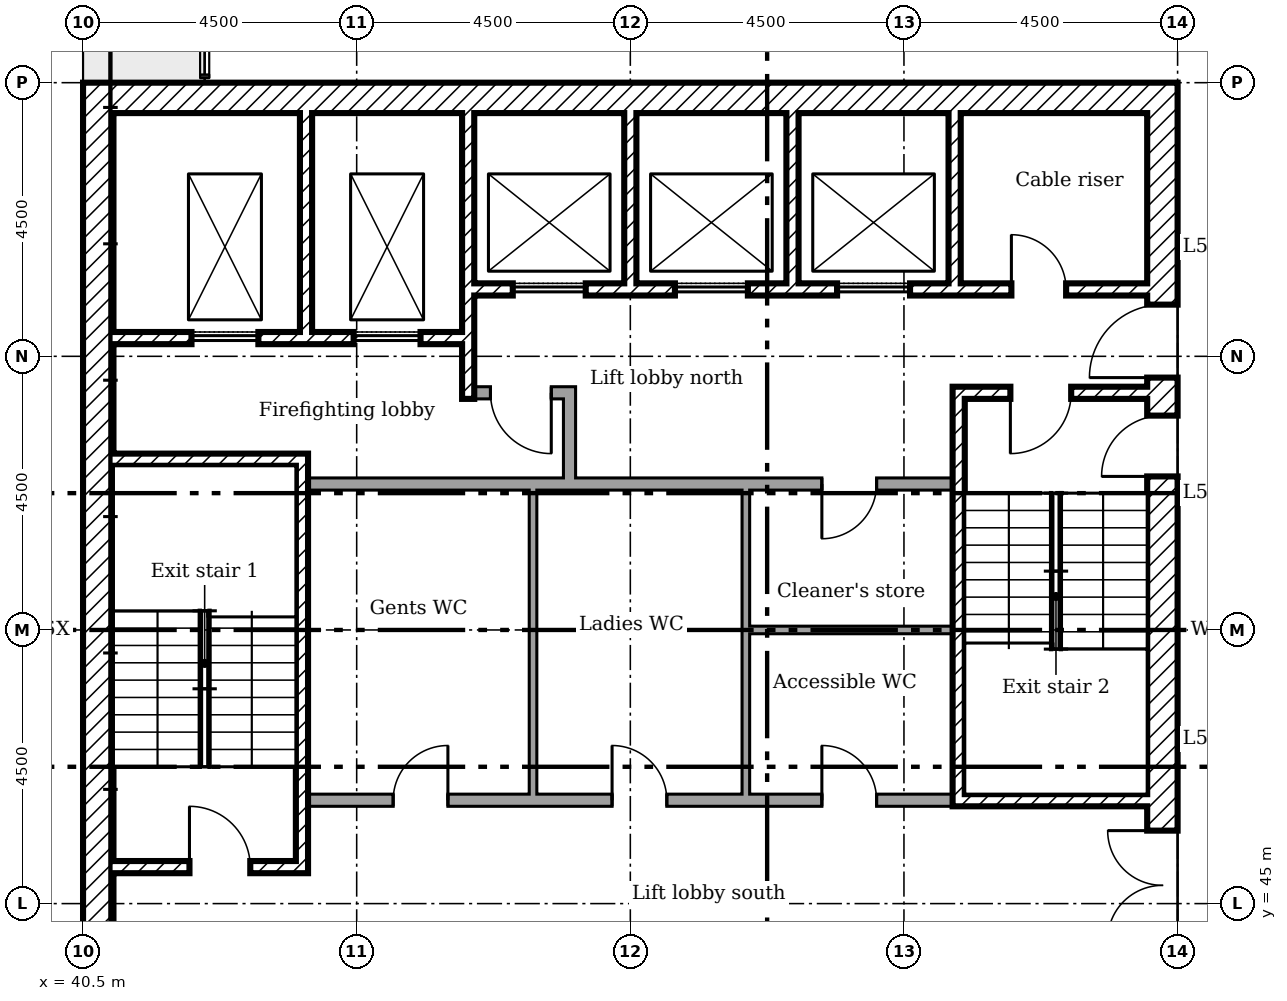
"""IFC4 building model, lengths in metres.
Left out: names, types, materials, properties, quantities, classifications, styles, units other than length and angle.
Written with IfcOpenShell. Run it as: python <this file> out.ifc"""

import sys

from ifc_helpers import new_model, si_unit, direction, frame, frame_2d, origin, place, context, subcontext, project, spatial, rectangle, extrude, element, fill, save


model = new_model("IFC4")
c1 = context("Model", 3, precision=1e-05, world=origin(), true_north=direction((0.0, 1.0)))
c2 = subcontext(c1, "Body", "Model", "MODEL_VIEW")
j1 = project(units=[si_unit("LENGTHUNIT", "METRE"), si_unit("PLANEANGLEUNIT", "RADIAN")], contexts=[c1])
p1 = place(None, origin())
s1 = spatial("IfcSite", under=j1, at=p1, CompositionType="ELEMENT")
p2 = place(p1, origin())
s2 = spatial("IfcBuilding", under=s1, at=p2, CompositionType="ELEMENT")
p3 = place(p2, frame((0.0, 0.0, 210.0)))
s3 = spatial("IfcBuildingStorey", under=s2, at=p3, CompositionType="ELEMENT", Elevation=210.0)
p4 = place(p3, frame((58.25, 40.5, 0.0), z_axis=(0.0, 0.0, 1.0), x_axis=(0.0, 1.0, 0.0)))
e1 = element("IfcWall", 1, at=p4, inside=s3, PredefinedType="SHEAR", context=c2, shape_type="SweptSolid", body=[
    extrude(rectangle(XDim=18.0, YDim=0.5, at=frame_2d((9.0, 0.0))), origin(), (0.0, 0.0, 1.0), 3.35),
])
p5 = place(p4, frame((13.15, 0.0, 0.0)))
e2 = element("IfcOpeningElement", 2, at=p5, cuts=e1, PredefinedType="OPENING", context=c2, shape_type="SweptSolid", body=[
    extrude(rectangle(XDim=1.2, YDim=2.1, at=frame_2d((0.6, 1.05))), frame((0.0, 0.26, 0.0), z_axis=(0.0, -1.0, 0.0), x_axis=(1.0, 0.0, 0.0)), (0.0, 0.0, 1.0), 0.52),
])
p6 = place(p4, frame((3.9, 0.0, 0.0)))
e3 = element("IfcOpeningElement", 3, at=p6, cuts=e1, PredefinedType="OPENING", context=c2, shape_type="SweptSolid", body=[
    extrude(rectangle(XDim=1.8, YDim=2.1, at=frame_2d((0.9, 1.05))), frame((0.0, 0.26, 0.0), z_axis=(0.0, -1.0, 0.0), x_axis=(1.0, 0.0, 0.0)), (0.0, 0.0, 1.0), 0.52),
])
p7 = place(p4, frame((11.525, 0.0, 0.0)))
e4 = element("IfcOpeningElement", 4, at=p7, cuts=e1, PredefinedType="OPENING", context=c2, shape_type="SweptSolid", body=[
    extrude(rectangle(XDim=1.0, YDim=2.1, at=frame_2d((0.5, 1.05))), frame((0.0, 0.26, 0.0), z_axis=(0.0, -1.0, 0.0), x_axis=(1.0, 0.0, 0.0)), (0.0, 0.0, 1.0), 0.52),
])
p8 = place(p3, frame((40.5, 58.25, 0.0)))
e5 = element("IfcWall", 5, at=p8, inside=s3, PredefinedType="SHEAR", context=c2, shape_type="SweptSolid", body=[
    extrude(rectangle(XDim=17.5, YDim=0.5, at=frame_2d((8.75, 0.0))), origin(), (0.0, 0.0, 1.0), 3.35),
])
p9 = place(p3, frame((40.75, 41.0, 0.0), z_axis=(0.0, 0.0, 1.0), x_axis=(0.0, 1.0, 0.0)))
e6 = element("IfcWall", 6, at=p9, inside=s3, PredefinedType="SHEAR", context=c2, shape_type="SweptSolid", body=[
    extrude(rectangle(XDim=17.0, YDim=0.5, at=frame_2d((8.5, 0.0))), origin(), (0.0, 0.0, 1.0), 3.35),
])
p10 = place(p3, frame((44.167, 58.0, 0.0), z_axis=(0.0, 0.0, 1.0), x_axis=(0.0, -1.0, 0.0)))
e7 = element("IfcWall", 7, at=p10, inside=s3, PredefinedType="SHEAR", context=c2, shape_type="SweptSolid", body=[
    extrude(rectangle(XDim=3.6, YDim=0.2, at=frame_2d((1.8, 0.0))), origin(), (0.0, 0.0, 1.0), 3.35),
])
p11 = place(p3, frame((46.833, 58.0, 0.0), z_axis=(0.0, 0.0, 1.0), x_axis=(0.0, -1.0, 0.0)))
e8 = element("IfcWall", 8, at=p11, inside=s3, PredefinedType="SHEAR", context=c2, shape_type="SweptSolid", body=[
    extrude(rectangle(XDim=4.7, YDim=0.2, at=frame_2d((2.35, 0.0))), origin(), (0.0, 0.0, 1.0), 3.35),
])
for number, where, z_axis, x_axis in (
    (9, (49.5, 58.0, 0.0), (0.0, 0.0, 1.0), (0.0, -1.0, 0.0)),
    (10, (52.167, 58.0, 0.0), (0.0, 0.0, 1.0), (0.0, -1.0, 0.0)),
    (11, (54.833, 58.0, 0.0), (0.0, 0.0, 1.0), (0.0, -1.0, 0.0)),
):
    element("IfcWall", number, at=place(p3, frame(where, z_axis=z_axis, x_axis=x_axis)), inside=s3, PredefinedType="SHEAR", context=c2, shape_type="SweptSolid", body=[
        extrude(rectangle(XDim=2.8, YDim=0.2, at=frame_2d((1.4, 0.0))), origin(), (0.0, 0.0, 1.0), 3.35),
    ])
p12 = place(p3, frame((48.5, 51.9, 0.0), z_axis=(0.0, 0.0, 1.0), x_axis=(0.0, 1.0, 0.0)))
e12 = element("IfcWall", 12, at=p12, inside=s3, PredefinedType="PARTITIONING", context=c2, shape_type="SweptSolid", body=[
    extrude(rectangle(XDim=1.6, YDim=0.2, at=frame_2d((0.8, 0.0))), origin(), (0.0, 0.0, 1.0), 3.35),
])
p13 = place(p3, frame((46.933, 53.4, 0.0)))
e13 = element("IfcWall", 13, at=p13, inside=s3, PredefinedType="PARTITIONING", context=c2, shape_type="SweptSolid", body=[
    extrude(rectangle(XDim=1.467, YDim=0.2, at=frame_2d((0.733, 0.0))), origin(), (0.0, 0.0, 1.0), 3.35),
])
p14 = place(p13, frame((0.267, 0.0, 0.0)))
e14 = element("IfcOpeningElement", 14, at=p14, cuts=e13, PredefinedType="OPENING", context=c2, shape_type="SweptSolid", body=[
    extrude(rectangle(XDim=1.0, YDim=2.1, at=frame_2d((0.5, 1.05))), frame((0.0, 0.11, 0.0), z_axis=(0.0, -1.0, 0.0), x_axis=(1.0, 0.0, 0.0)), (0.0, 0.0, 1.0), 0.22),
])
p15 = place(p3, frame((46.933, 55.1, 0.0)))
e15 = element("IfcWall", 15, at=p15, inside=s3, PredefinedType="SHEAR", context=c2, shape_type="SweptSolid", body=[
    extrude(rectangle(XDim=11.067, YDim=0.2, at=frame_2d((5.533, 0.0))), origin(), (0.0, 0.0, 1.0), 3.35),
])
p16 = place(p15, frame((8.833, 0.0, 0.0)))
e16 = element("IfcOpeningElement", 16, at=p16, cuts=e15, PredefinedType="OPENING", context=c2, shape_type="SweptSolid", body=[
    extrude(rectangle(XDim=0.9, YDim=2.1, at=frame_2d((0.45, 1.05))), frame((0.0, 0.11, 0.0), z_axis=(0.0, -1.0, 0.0), x_axis=(1.0, 0.0, 0.0)), (0.0, 0.0, 1.0), 0.22),
])
p17 = place(p15, frame((0.633, 0.0, 0.0)))
e17 = element("IfcOpeningElement", 17, at=p17, cuts=e15, PredefinedType="OPENING", context=c2, shape_type="SweptSolid", body=[
    extrude(rectangle(XDim=1.2, YDim=2.1, at=frame_2d((0.6, 1.05))), frame((0.0, 0.11, 0.0), z_axis=(0.0, -1.0, 0.0), x_axis=(1.0, 0.0, 0.0)), (0.0, 0.0, 1.0), 0.22),
])
p18 = place(p15, frame((3.3, 0.0, 0.0)))
e18 = element("IfcOpeningElement", 18, at=p18, cuts=e15, PredefinedType="OPENING", context=c2, shape_type="SweptSolid", body=[
    extrude(rectangle(XDim=1.2, YDim=2.1, at=frame_2d((0.6, 1.05))), frame((0.0, 0.11, 0.0), z_axis=(0.0, -1.0, 0.0), x_axis=(1.0, 0.0, 0.0)), (0.0, 0.0, 1.0), 0.22),
])
p19 = place(p15, frame((5.967, 0.0, 0.0)))
e19 = element("IfcOpeningElement", 19, at=p19, cuts=e15, PredefinedType="OPENING", context=c2, shape_type="SweptSolid", body=[
    extrude(rectangle(XDim=1.2, YDim=2.1, at=frame_2d((0.6, 1.05))), frame((0.0, 0.11, 0.0), z_axis=(0.0, -1.0, 0.0), x_axis=(1.0, 0.0, 0.0)), (0.0, 0.0, 1.0), 0.22),
])
p20 = place(p3, frame((41.0, 54.3, 0.0)))
e20 = element("IfcWall", 20, at=p20, inside=s3, PredefinedType="SHEAR", context=c2, shape_type="SweptSolid", body=[
    extrude(rectangle(XDim=5.733, YDim=0.2, at=frame_2d((2.867, 0.0))), origin(), (0.0, 0.0, 1.0), 3.35),
])
p21 = place(p20, frame((1.283, 0.0, 0.0)))
e21 = element("IfcOpeningElement", 21, at=p21, cuts=e20, PredefinedType="OPENING", context=c2, shape_type="SweptSolid", body=[
    extrude(rectangle(XDim=1.1, YDim=2.1, at=frame_2d((0.55, 1.05))), frame((0.0, 0.11, 0.0), z_axis=(0.0, -1.0, 0.0), x_axis=(1.0, 0.0, 0.0)), (0.0, 0.0, 1.0), 0.22),
])
p22 = place(p20, frame((3.95, 0.0, 0.0)))
e22 = element("IfcOpeningElement", 22, at=p22, cuts=e20, PredefinedType="OPENING", context=c2, shape_type="SweptSolid", body=[
    extrude(rectangle(XDim=1.1, YDim=2.1, at=frame_2d((0.55, 1.05))), frame((0.0, 0.11, 0.0), z_axis=(0.0, -1.0, 0.0), x_axis=(1.0, 0.0, 0.0)), (0.0, 0.0, 1.0), 0.22),
])
p23 = place(p3, frame((44.1, 45.5, 0.0), z_axis=(0.0, 0.0, 1.0), x_axis=(0.0, 1.0, 0.0)))
e23 = element("IfcWall", 23, at=p23, inside=s3, PredefinedType="SHEAR", context=c2, shape_type="SweptSolid", body=[
    extrude(rectangle(XDim=6.9, YDim=0.2, at=frame_2d((3.45, 0.0))), origin(), (0.0, 0.0, 1.0), 3.35),
])
p24 = place(p3, frame((41.0, 52.3, 0.0)))
e24 = element("IfcWall", 24, at=p24, inside=s3, PredefinedType="SHEAR", context=c2, shape_type="SweptSolid", body=[
    extrude(rectangle(XDim=3.0, YDim=0.2, at=frame_2d((1.5, 0.0))), origin(), (0.0, 0.0, 1.0), 3.35),
])
p25 = place(p3, frame((41.0, 45.6, 0.0)))
e25 = element("IfcWall", 25, at=p25, inside=s3, PredefinedType="SHEAR", context=c2, shape_type="SweptSolid", body=[
    extrude(rectangle(XDim=3.0, YDim=0.2, at=frame_2d((1.5, 0.0))), origin(), (0.0, 0.0, 1.0), 3.35),
])
p26 = place(p25, frame((1.25, 0.0, 0.0)))
e26 = element("IfcOpeningElement", 26, at=p26, cuts=e25, PredefinedType="OPENING", context=c2, shape_type="SweptSolid", body=[
    extrude(rectangle(XDim=1.0, YDim=2.1, at=frame_2d((0.5, 1.05))), frame((0.0, 0.11, 0.0), z_axis=(0.0, -1.0, 0.0), x_axis=(1.0, 0.0, 0.0)), (0.0, 0.0, 1.0), 0.22),
])
p27 = place(p3, frame((54.8, 53.4, 0.0)))
e27 = element("IfcWall", 27, at=p27, inside=s3, PredefinedType="SHEAR", context=c2, shape_type="SweptSolid", body=[
    extrude(rectangle(XDim=3.2, YDim=0.2, at=frame_2d((1.6, 0.0))), origin(), (0.0, 0.0, 1.0), 3.35),
])
p28 = place(p27, frame((0.95, 0.0, 0.0)))
e28 = element("IfcOpeningElement", 28, at=p28, cuts=e27, PredefinedType="OPENING", context=c2, shape_type="SweptSolid", body=[
    extrude(rectangle(XDim=1.0, YDim=2.1, at=frame_2d((0.5, 1.05))), frame((0.0, 0.11, 0.0), z_axis=(0.0, -1.0, 0.0), x_axis=(1.0, 0.0, 0.0)), (0.0, 0.0, 1.0), 0.22),
])
p29 = place(p3, frame((54.8, 46.7, 0.0)))
e29 = element("IfcWall", 29, at=p29, inside=s3, PredefinedType="SHEAR", context=c2, shape_type="SweptSolid", body=[
    extrude(rectangle(XDim=3.2, YDim=0.2, at=frame_2d((1.6, 0.0))), origin(), (0.0, 0.0, 1.0), 3.35),
])
p30 = place(p3, frame((54.9, 46.8, 0.0), z_axis=(0.0, 0.0, 1.0), x_axis=(0.0, 1.0, 0.0)))
e30 = element("IfcWall", 30, at=p30, inside=s3, PredefinedType="SHEAR", context=c2, shape_type="SweptSolid", body=[
    extrude(rectangle(XDim=6.5, YDim=0.2, at=frame_2d((3.25, 0.0))), origin(), (0.0, 0.0, 1.0), 3.35),
])
p31 = place(p3, frame((44.2, 51.9, 0.0)))
e31 = element("IfcWall", 31, at=p31, inside=s3, PredefinedType="PARTITIONING", context=c2, shape_type="SweptSolid", body=[
    extrude(rectangle(XDim=10.6, YDim=0.2, at=frame_2d((5.3, 0.0))), origin(), (0.0, 0.0, 1.0), 3.35),
])
p32 = place(p31, frame((8.45, 0.0, 0.0)))
e32 = element("IfcOpeningElement", 32, at=p32, cuts=e31, PredefinedType="OPENING", context=c2, shape_type="SweptSolid", body=[
    extrude(rectangle(XDim=0.9, YDim=2.1, at=frame_2d((0.45, 1.05))), frame((0.0, 0.11, 0.0), z_axis=(0.0, -1.0, 0.0), x_axis=(1.0, 0.0, 0.0)), (0.0, 0.0, 1.0), 0.22),
])
p33 = place(p3, frame((44.2, 46.7, 0.0)))
e33 = element("IfcWall", 33, at=p33, inside=s3, PredefinedType="PARTITIONING", context=c2, shape_type="SweptSolid", body=[
    extrude(rectangle(XDim=10.6, YDim=0.2, at=frame_2d((5.3, 0.0))), origin(), (0.0, 0.0, 1.0), 3.35),
])
p34 = place(p33, frame((1.4, 0.0, 0.0)))
e34 = element("IfcOpeningElement", 34, at=p34, cuts=e33, PredefinedType="OPENING", context=c2, shape_type="SweptSolid", body=[
    extrude(rectangle(XDim=0.9, YDim=2.1, at=frame_2d((0.45, 1.05))), frame((0.0, 0.11, 0.0), z_axis=(0.0, -1.0, 0.0), x_axis=(1.0, 0.0, 0.0)), (0.0, 0.0, 1.0), 0.22),
])
p35 = place(p33, frame((5.0, 0.0, 0.0)))
e35 = element("IfcOpeningElement", 35, at=p35, cuts=e33, PredefinedType="OPENING", context=c2, shape_type="SweptSolid", body=[
    extrude(rectangle(XDim=0.9, YDim=2.1, at=frame_2d((0.45, 1.05))), frame((0.0, 0.11, 0.0), z_axis=(0.0, -1.0, 0.0), x_axis=(1.0, 0.0, 0.0)), (0.0, 0.0, 1.0), 0.22),
])
p36 = place(p33, frame((8.45, 0.0, 0.0)))
e36 = element("IfcOpeningElement", 36, at=p36, cuts=e33, PredefinedType="OPENING", context=c2, shape_type="SweptSolid", body=[
    extrude(rectangle(XDim=0.9, YDim=2.1, at=frame_2d((0.45, 1.05))), frame((0.0, 0.11, 0.0), z_axis=(0.0, -1.0, 0.0), x_axis=(1.0, 0.0, 0.0)), (0.0, 0.0, 1.0), 0.22),
])
p37 = place(p3, frame((47.9, 46.8, 0.0), z_axis=(0.0, 0.0, 1.0), x_axis=(0.0, 1.0, 0.0)))
e37 = element("IfcWall", 37, at=p37, inside=s3, PredefinedType="PARTITIONING", context=c2, shape_type="SweptSolid", body=[
    extrude(rectangle(XDim=5.0, YDim=0.125, at=frame_2d((2.5, 0.0))), origin(), (0.0, 0.0, 1.0), 3.35),
])
p38 = place(p3, frame((51.4, 46.8, 0.0), z_axis=(0.0, 0.0, 1.0), x_axis=(0.0, 1.0, 0.0)))
e38 = element("IfcWall", 38, at=p38, inside=s3, PredefinedType="PARTITIONING", context=c2, shape_type="SweptSolid", body=[
    extrude(rectangle(XDim=2.762, YDim=0.125, at=frame_2d((1.381, 0.0))), origin(), (0.0, 0.0, 1.0), 3.35),
])
p39 = place(p3, frame((54.8, 49.5, 0.0), z_axis=(0.0, 0.0, 1.0), x_axis=(-1.0, 0.0, 0.0)))
e39 = element("IfcWall", 39, at=p39, inside=s3, PredefinedType="PARTITIONING", context=c2, shape_type="SweptSolid", body=[
    extrude(rectangle(XDim=3.338, YDim=0.125, at=frame_2d((1.669, 0.0))), origin(), (0.0, 0.0, 1.0), 3.35),
])
p40 = place(p3, frame((51.4, 49.5, 0.0), z_axis=(0.0, 0.0, 1.0), x_axis=(0.0, 1.0, 0.0)))
e40 = element("IfcWall", 40, at=p40, inside=s3, PredefinedType="PARTITIONING", context=c2, shape_type="SweptSolid", body=[
    extrude(rectangle(XDim=2.3, YDim=0.125, at=frame_2d((1.15, 0.0))), origin(), (0.0, 0.0, 1.0), 3.35),
])
p41 = place(p5, origin())
e41 = element("IfcDoor", 41, at=p41, inside=s3, OperationType="SINGLE_SWING_RIGHT", PredefinedType="DOOR", context=c2, shape_type="SweptSolid", body=[
    extrude(rectangle(XDim=1.2, YDim=2.1, at=frame_2d((0.6, 1.05))), frame((0.0, 0.025, 0.0), z_axis=(0.0, -1.0, 0.0), x_axis=(1.0, 0.0, 0.0)), (0.0, 0.0, 1.0), 0.05),
])
fill(e2, e41)
p42 = place(p6, origin())
e42 = element("IfcDoor", 42, at=p42, inside=s3, OperationType="DOUBLE_DOOR_SINGLE_SWING", PredefinedType="DOOR", context=c2, shape_type="SweptSolid", body=[
    extrude(rectangle(XDim=1.8, YDim=2.1, at=frame_2d((0.9, 1.05))), frame((0.0, 0.025, 0.0), z_axis=(0.0, -1.0, 0.0), x_axis=(1.0, 0.0, 0.0)), (0.0, 0.0, 1.0), 0.05),
])
fill(e3, e42)
p43 = place(p26, origin())
e43 = element("IfcDoor", 43, at=p43, inside=s3, OperationType="SINGLE_SWING_RIGHT", PredefinedType="DOOR", context=c2, shape_type="SweptSolid", body=[
    extrude(rectangle(XDim=1.0, YDim=2.1, at=frame_2d((0.5, 1.05))), frame((0.0, 0.025, 0.0), z_axis=(0.0, -1.0, 0.0), x_axis=(1.0, 0.0, 0.0)), (0.0, 0.0, 1.0), 0.05),
])
fill(e26, e43)
p44 = place(p28, frame((1.0, 0.0, 0.0), x_axis=(-1.0, 0.0, 0.0)))
e44 = element("IfcDoor", 44, at=p44, inside=s3, OperationType="SINGLE_SWING_LEFT", PredefinedType="DOOR", context=c2, shape_type="SweptSolid", body=[
    extrude(rectangle(XDim=1.0, YDim=2.1, at=frame_2d((0.5, 1.05))), frame((0.0, 0.025, 0.0), z_axis=(0.0, -1.0, 0.0), x_axis=(1.0, 0.0, 0.0)), (0.0, 0.0, 1.0), 0.05),
])
fill(e28, e44)
p45 = place(p7, origin())
e45 = element("IfcDoor", 45, at=p45, inside=s3, OperationType="SINGLE_SWING_RIGHT", PredefinedType="DOOR", context=c2, shape_type="SweptSolid", body=[
    extrude(rectangle(XDim=1.0, YDim=2.1, at=frame_2d((0.5, 1.05))), frame((0.0, 0.025, 0.0), z_axis=(0.0, -1.0, 0.0), x_axis=(1.0, 0.0, 0.0)), (0.0, 0.0, 1.0), 0.05),
])
fill(e4, e45)
p46 = place(p14, frame((1.0, 0.0, 0.0), x_axis=(-1.0, 0.0, 0.0)))
e46 = element("IfcDoor", 46, at=p46, inside=s3, OperationType="SINGLE_SWING_RIGHT", PredefinedType="DOOR", context=c2, shape_type="SweptSolid", body=[
    extrude(rectangle(XDim=1.0, YDim=2.1, at=frame_2d((0.5, 1.05))), frame((0.0, 0.025, 0.0), z_axis=(0.0, -1.0, 0.0), x_axis=(1.0, 0.0, 0.0)), (0.0, 0.0, 1.0), 0.05),
])
fill(e14, e46)
p47 = place(p16, origin())
e47 = element("IfcDoor", 47, at=p47, inside=s3, OperationType="SINGLE_SWING_RIGHT", PredefinedType="DOOR", context=c2, shape_type="SweptSolid", body=[
    extrude(rectangle(XDim=0.9, YDim=2.1, at=frame_2d((0.45, 1.05))), frame((0.0, 0.025, 0.0), z_axis=(0.0, -1.0, 0.0), x_axis=(1.0, 0.0, 0.0)), (0.0, 0.0, 1.0), 0.05),
])
fill(e16, e47)
p48 = place(p34, origin())
e48 = element("IfcDoor", 48, at=p48, inside=s3, OperationType="SINGLE_SWING_LEFT", PredefinedType="DOOR", context=c2, shape_type="SweptSolid", body=[
    extrude(rectangle(XDim=0.9, YDim=2.1, at=frame_2d((0.45, 1.05))), frame((0.0, 0.025, 0.0), z_axis=(0.0, -1.0, 0.0), x_axis=(1.0, 0.0, 0.0)), (0.0, 0.0, 1.0), 0.05),
])
fill(e34, e48)
p49 = place(p35, origin())
e49 = element("IfcDoor", 49, at=p49, inside=s3, OperationType="SINGLE_SWING_RIGHT", PredefinedType="DOOR", context=c2, shape_type="SweptSolid", body=[
    extrude(rectangle(XDim=0.9, YDim=2.1, at=frame_2d((0.45, 1.05))), frame((0.0, 0.025, 0.0), z_axis=(0.0, -1.0, 0.0), x_axis=(1.0, 0.0, 0.0)), (0.0, 0.0, 1.0), 0.05),
])
fill(e35, e49)
p50 = place(p36, origin())
e50 = element("IfcDoor", 50, at=p50, inside=s3, OperationType="SINGLE_SWING_RIGHT", PredefinedType="DOOR", context=c2, shape_type="SweptSolid", body=[
    extrude(rectangle(XDim=0.9, YDim=2.1, at=frame_2d((0.45, 1.05))), frame((0.0, 0.025, 0.0), z_axis=(0.0, -1.0, 0.0), x_axis=(1.0, 0.0, 0.0)), (0.0, 0.0, 1.0), 0.05),
])
fill(e36, e50)
p51 = place(p32, frame((0.9, 0.0, 0.0), x_axis=(-1.0, 0.0, 0.0)))
e51 = element("IfcDoor", 51, at=p51, inside=s3, OperationType="SINGLE_SWING_LEFT", PredefinedType="DOOR", context=c2, shape_type="SweptSolid", body=[
    extrude(rectangle(XDim=0.9, YDim=2.1, at=frame_2d((0.45, 1.05))), frame((0.0, 0.025, 0.0), z_axis=(0.0, -1.0, 0.0), x_axis=(1.0, 0.0, 0.0)), (0.0, 0.0, 1.0), 0.05),
])
fill(e32, e51)
p52 = place(p21, origin())
e52 = element("IfcDoor", 52, at=p52, inside=s3, OperationType="SLIDING_TO_LEFT", PredefinedType="DOOR", context=c2, shape_type="SweptSolid", body=[
    extrude(rectangle(XDim=1.1, YDim=2.1, at=frame_2d((0.55, 1.05))), frame((0.0, 0.025, 0.0), z_axis=(0.0, -1.0, 0.0), x_axis=(1.0, 0.0, 0.0)), (0.0, 0.0, 1.0), 0.05),
])
fill(e21, e52)
p53 = place(p22, origin())
e53 = element("IfcDoor", 53, at=p53, inside=s3, OperationType="SLIDING_TO_LEFT", PredefinedType="DOOR", context=c2, shape_type="SweptSolid", body=[
    extrude(rectangle(XDim=1.1, YDim=2.1, at=frame_2d((0.55, 1.05))), frame((0.0, 0.025, 0.0), z_axis=(0.0, -1.0, 0.0), x_axis=(1.0, 0.0, 0.0)), (0.0, 0.0, 1.0), 0.05),
])
fill(e22, e53)
p54 = place(p17, origin())
e54 = element("IfcDoor", 54, at=p54, inside=s3, OperationType="SLIDING_TO_LEFT", PredefinedType="DOOR", context=c2, shape_type="SweptSolid", body=[
    extrude(rectangle(XDim=1.2, YDim=2.1, at=frame_2d((0.6, 1.05))), frame((0.0, 0.025, 0.0), z_axis=(0.0, -1.0, 0.0), x_axis=(1.0, 0.0, 0.0)), (0.0, 0.0, 1.0), 0.05),
])
fill(e17, e54)
p55 = place(p18, origin())
e55 = element("IfcDoor", 55, at=p55, inside=s3, OperationType="SLIDING_TO_LEFT", PredefinedType="DOOR", context=c2, shape_type="SweptSolid", body=[
    extrude(rectangle(XDim=1.2, YDim=2.1, at=frame_2d((0.6, 1.05))), frame((0.0, 0.025, 0.0), z_axis=(0.0, -1.0, 0.0), x_axis=(1.0, 0.0, 0.0)), (0.0, 0.0, 1.0), 0.05),
])
fill(e18, e55)
p56 = place(p19, origin())
e56 = element("IfcDoor", 56, at=p56, inside=s3, OperationType="SLIDING_TO_LEFT", PredefinedType="DOOR", context=c2, shape_type="SweptSolid", body=[
    extrude(rectangle(XDim=1.2, YDim=2.1, at=frame_2d((0.6, 1.05))), frame((0.0, 0.025, 0.0), z_axis=(0.0, -1.0, 0.0), x_axis=(1.0, 0.0, 0.0)), (0.0, 0.0, 1.0), 0.05),
])
fill(e19, e56)
save(model, sys.argv[1])
